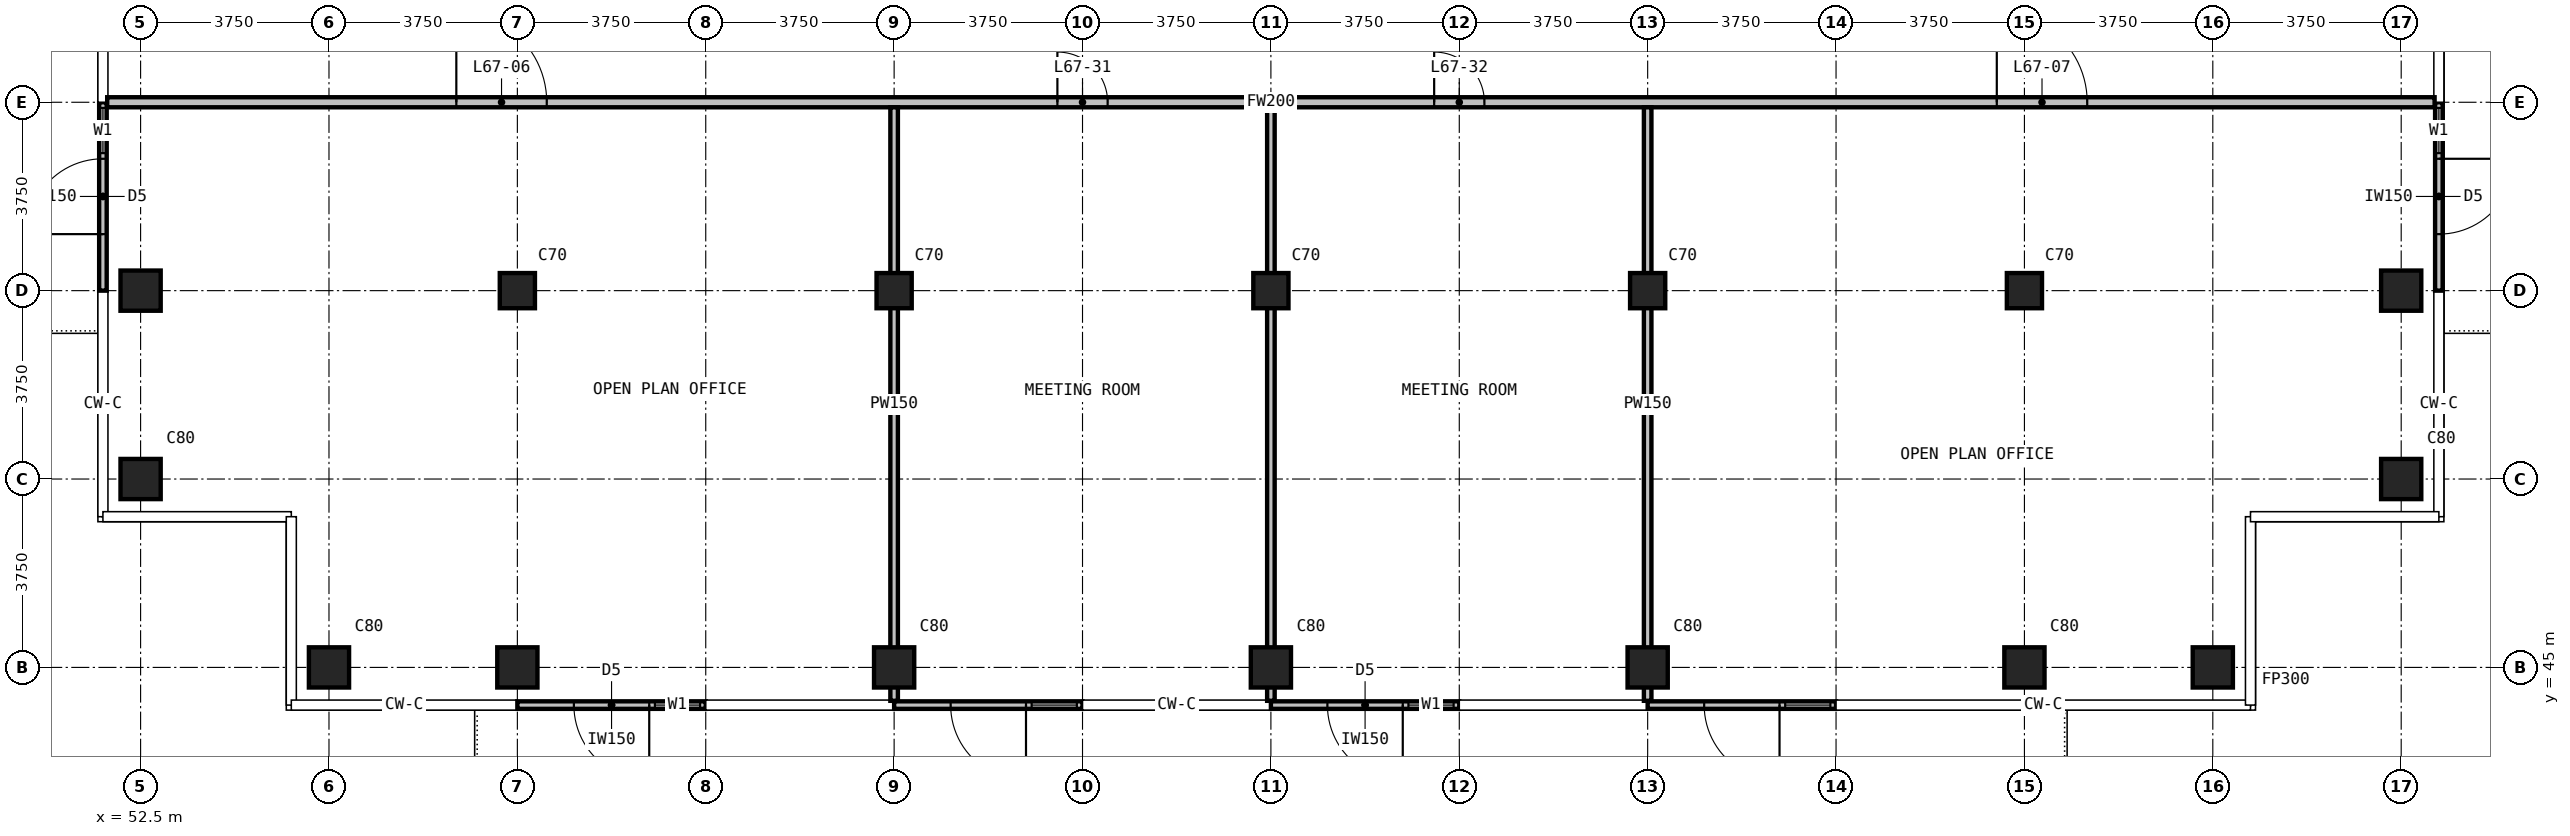
"""IFC4 building model, lengths in metres.
Left out: names, types, materials, properties, quantities, classifications, styles, units other than length and angle.
Written with IfcOpenShell. Run it as: python <this file> out.ifc"""

import sys

from ifc_helpers import new_model, si_unit, direction, frame, frame_2d, origin, origin_2d, place, context, subcontext, project, spatial, rectangle, extrude, element, fill, save


model = new_model("IFC4")
c1 = context("Model", 3, precision=1e-05, world=origin(), true_north=direction((0.0, 1.0)))
c2 = subcontext(c1, "Body", "Model", "MODEL_VIEW")
j1 = project(units=[si_unit("LENGTHUNIT", "METRE"), si_unit("PLANEANGLEUNIT", "RADIAN")], contexts=[c1])
p1 = place(None, origin())
s1 = spatial("IfcSite", under=j1, at=p1, CompositionType="ELEMENT")
p2 = place(p1, origin())
s2 = spatial("IfcBuilding", under=s1, at=p2, CompositionType="ELEMENT")
p3 = place(p2, frame((0.0, 0.0, 258.5)))
s3 = spatial("IfcBuildingStorey", under=s2, at=p3, CompositionType="ELEMENT", Elevation=258.5)
for number, where, z_axis, x_axis in (
    (1, (52.5, 48.75, 0.0), (0.0, 0.0, 1.0), (1.0, 0.0, 0.0)),
    (2, (52.5, 52.5, 0.0), (0.0, 0.0, 1.0), (1.0, 0.0, 0.0)),
    (3, (56.25, 45.0, 0.0), (0.0, 0.0, 1.0), (1.0, 0.0, 0.0)),
    (4, (60.0, 45.0, 0.0), (0.0, 0.0, 1.0), (1.0, 0.0, 0.0)),
):
    element("IfcColumn", number, at=place(p3, frame(where, z_axis=z_axis, x_axis=x_axis)), inside=s3, PredefinedType="COLUMN", context=c2, shape_type="SweptSolid", body=[
        extrude(rectangle(XDim=0.8, YDim=0.8, at=origin_2d()), origin(), (0.0, 0.0, 1.0), 3.6),
    ])
p4 = place(p3, frame((60.0, 52.5, 0.0), z_axis=(0.0, 0.0, 1.0), x_axis=(1.0, 0.0, 0.0)))
e5 = element("IfcColumn", 5, at=p4, inside=s3, PredefinedType="COLUMN", context=c2, shape_type="SweptSolid", body=[
    extrude(rectangle(XDim=0.7, YDim=0.7, at=origin_2d()), origin(), (0.0, 0.0, 1.0), 3.6),
])
p5 = place(p3, frame((67.5, 45.0, 0.0), z_axis=(0.0, 0.0, 1.0), x_axis=(1.0, 0.0, 0.0)))
e6 = element("IfcColumn", 6, at=p5, inside=s3, PredefinedType="COLUMN", context=c2, shape_type="SweptSolid", body=[
    extrude(rectangle(XDim=0.8, YDim=0.8, at=origin_2d()), origin(), (0.0, 0.0, 1.0), 3.6),
])
p6 = place(p3, frame((67.5, 52.5, 0.0), z_axis=(0.0, 0.0, 1.0), x_axis=(1.0, 0.0, 0.0)))
e7 = element("IfcColumn", 7, at=p6, inside=s3, PredefinedType="COLUMN", context=c2, shape_type="SweptSolid", body=[
    extrude(rectangle(XDim=0.7, YDim=0.7, at=origin_2d()), origin(), (0.0, 0.0, 1.0), 3.6),
])
p7 = place(p3, frame((75.0, 45.0, 0.0), z_axis=(0.0, 0.0, 1.0), x_axis=(1.0, 0.0, 0.0)))
e8 = element("IfcColumn", 8, at=p7, inside=s3, PredefinedType="COLUMN", context=c2, shape_type="SweptSolid", body=[
    extrude(rectangle(XDim=0.8, YDim=0.8, at=origin_2d()), origin(), (0.0, 0.0, 1.0), 3.6),
])
p8 = place(p3, frame((75.0, 52.5, 0.0), z_axis=(0.0, 0.0, 1.0), x_axis=(1.0, 0.0, 0.0)))
e9 = element("IfcColumn", 9, at=p8, inside=s3, PredefinedType="COLUMN", context=c2, shape_type="SweptSolid", body=[
    extrude(rectangle(XDim=0.7, YDim=0.7, at=origin_2d()), origin(), (0.0, 0.0, 1.0), 3.6),
])
p9 = place(p3, frame((82.5, 45.0, 0.0), z_axis=(0.0, 0.0, 1.0), x_axis=(1.0, 0.0, 0.0)))
e10 = element("IfcColumn", 10, at=p9, inside=s3, PredefinedType="COLUMN", context=c2, shape_type="SweptSolid", body=[
    extrude(rectangle(XDim=0.8, YDim=0.8, at=origin_2d()), origin(), (0.0, 0.0, 1.0), 3.6),
])
p10 = place(p3, frame((82.5, 52.5, 0.0), z_axis=(0.0, 0.0, 1.0), x_axis=(1.0, 0.0, 0.0)))
e11 = element("IfcColumn", 11, at=p10, inside=s3, PredefinedType="COLUMN", context=c2, shape_type="SweptSolid", body=[
    extrude(rectangle(XDim=0.7, YDim=0.7, at=origin_2d()), origin(), (0.0, 0.0, 1.0), 3.6),
])
p11 = place(p3, frame((90.0, 45.0, 0.0), z_axis=(0.0, 0.0, 1.0), x_axis=(1.0, 0.0, 0.0)))
e12 = element("IfcColumn", 12, at=p11, inside=s3, PredefinedType="COLUMN", context=c2, shape_type="SweptSolid", body=[
    extrude(rectangle(XDim=0.8, YDim=0.8, at=origin_2d()), origin(), (0.0, 0.0, 1.0), 3.6),
])
p12 = place(p3, frame((90.0, 52.5, 0.0), z_axis=(0.0, 0.0, 1.0), x_axis=(1.0, 0.0, 0.0)))
e13 = element("IfcColumn", 13, at=p12, inside=s3, PredefinedType="COLUMN", context=c2, shape_type="SweptSolid", body=[
    extrude(rectangle(XDim=0.7, YDim=0.7, at=origin_2d()), origin(), (0.0, 0.0, 1.0), 3.6),
])
for number, where, z_axis, x_axis in (
    (14, (93.75, 45.0, 0.0), (0.0, 0.0, 1.0), (1.0, 0.0, 0.0)),
    (15, (97.5, 48.75, 0.0), (0.0, 0.0, 1.0), (1.0, 0.0, 0.0)),
    (16, (97.5, 52.5, 0.0), (0.0, 0.0, 1.0), (1.0, 0.0, 0.0)),
):
    element("IfcColumn", number, at=place(p3, frame(where, z_axis=z_axis, x_axis=x_axis)), inside=s3, PredefinedType="COLUMN", context=c2, shape_type="SweptSolid", body=[
        extrude(rectangle(XDim=0.8, YDim=0.8, at=origin_2d()), origin(), (0.0, 0.0, 1.0), 3.6),
    ])
p13 = place(p3, frame((98.25, 56.25, 0.0), z_axis=(0.0, 0.0, 1.0), x_axis=(0.0, -1.0, 0.0)))
e17 = element("IfcWall", 17, at=p13, inside=s3, PredefinedType="SOLIDWALL", context=c2, shape_type="SweptSolid", body=[
    extrude(rectangle(XDim=3.75, YDim=0.15, at=frame_2d((1.875, 0.0))), origin(), (0.0, 0.0, 1.0), 3.3),
])
p14 = place(p13, frame((0.113, 0.0, 0.1)))
e18 = element("IfcOpeningElement", 18, at=p14, cuts=e17, PredefinedType="OPENING", context=c2, shape_type="SweptSolid", body=[
    extrude(rectangle(XDim=0.9, YDim=2.4, at=frame_2d((0.45, 1.2))), frame((0.0, 0.085, 0.0), z_axis=(0.0, -1.0, 0.0), x_axis=(1.0, 0.0, 0.0)), (0.0, 0.0, 1.0), 0.17),
])
p15 = place(p13, frame((1.125, 0.0, 0.0)))
e19 = element("IfcOpeningElement", 19, at=p15, cuts=e17, PredefinedType="OPENING", context=c2, shape_type="SweptSolid", body=[
    extrude(rectangle(XDim=1.5, YDim=2.4, at=frame_2d((0.75, 1.2))), frame((0.0, 0.085, 0.0), z_axis=(0.0, -1.0, 0.0), x_axis=(1.0, 0.0, 0.0)), (0.0, 0.0, 1.0), 0.17),
])
p16 = place(p3, frame((51.75, 52.5, 0.0), z_axis=(0.0, 0.0, 1.0), x_axis=(0.0, 1.0, 0.0)))
e20 = element("IfcWall", 20, at=p16, inside=s3, PredefinedType="SOLIDWALL", context=c2, shape_type="SweptSolid", body=[
    extrude(rectangle(XDim=3.75, YDim=0.15, at=frame_2d((1.875, 0.0))), origin(), (0.0, 0.0, 1.0), 3.3),
])
p17 = place(p16, frame((1.125, 0.0, 0.0)))
e21 = element("IfcOpeningElement", 21, at=p17, cuts=e20, PredefinedType="OPENING", context=c2, shape_type="SweptSolid", body=[
    extrude(rectangle(XDim=1.5, YDim=2.4, at=frame_2d((0.75, 1.2))), frame((0.0, 0.085, 0.0), z_axis=(0.0, -1.0, 0.0), x_axis=(1.0, 0.0, 0.0)), (0.0, 0.0, 1.0), 0.17),
])
p18 = place(p16, frame((2.738, 0.0, 0.1)))
e22 = element("IfcOpeningElement", 22, at=p18, cuts=e20, PredefinedType="OPENING", context=c2, shape_type="SweptSolid", body=[
    extrude(rectangle(XDim=0.9, YDim=2.4, at=frame_2d((0.45, 1.2))), frame((0.0, 0.085, 0.0), z_axis=(0.0, -1.0, 0.0), x_axis=(1.0, 0.0, 0.0)), (0.0, 0.0, 1.0), 0.17),
])
p19 = place(p3, frame((63.75, 44.25, 0.0), z_axis=(0.0, 0.0, 1.0), x_axis=(-1.0, 0.0, 0.0)))
e23 = element("IfcWall", 23, at=p19, inside=s3, PredefinedType="SOLIDWALL", context=c2, shape_type="SweptSolid", body=[
    extrude(rectangle(XDim=3.75, YDim=0.15, at=frame_2d((1.875, 0.0))), origin(), (0.0, 0.0, 1.0), 3.3),
])
p20 = place(p19, frame((0.113, 0.0, 0.1)))
e24 = element("IfcOpeningElement", 24, at=p20, cuts=e23, PredefinedType="OPENING", context=c2, shape_type="SweptSolid", body=[
    extrude(rectangle(XDim=0.9, YDim=2.4, at=frame_2d((0.45, 1.2))), frame((0.0, 0.085, 0.0), z_axis=(0.0, -1.0, 0.0), x_axis=(1.0, 0.0, 0.0)), (0.0, 0.0, 1.0), 0.17),
])
p21 = place(p19, frame((1.125, 0.0, 0.0)))
e25 = element("IfcOpeningElement", 25, at=p21, cuts=e23, PredefinedType="OPENING", context=c2, shape_type="SweptSolid", body=[
    extrude(rectangle(XDim=1.5, YDim=2.4, at=frame_2d((0.75, 1.2))), frame((0.0, 0.085, 0.0), z_axis=(0.0, -1.0, 0.0), x_axis=(1.0, 0.0, 0.0)), (0.0, 0.0, 1.0), 0.17),
])
p22 = place(p3, frame((71.25, 44.25, 0.0), z_axis=(0.0, 0.0, 1.0), x_axis=(-1.0, 0.0, 0.0)))
e26 = element("IfcWall", 26, at=p22, inside=s3, PredefinedType="SOLIDWALL", context=c2, shape_type="SweptSolid", body=[
    extrude(rectangle(XDim=3.75, YDim=0.15, at=frame_2d((1.875, 0.0))), origin(), (0.0, 0.0, 1.0), 3.3),
])
p23 = place(p22, frame((0.113, 0.0, 0.1)))
e27 = element("IfcOpeningElement", 27, at=p23, cuts=e26, PredefinedType="OPENING", context=c2, shape_type="SweptSolid", body=[
    extrude(rectangle(XDim=0.9, YDim=2.4, at=frame_2d((0.45, 1.2))), frame((0.0, 0.085, 0.0), z_axis=(0.0, -1.0, 0.0), x_axis=(1.0, 0.0, 0.0)), (0.0, 0.0, 1.0), 0.17),
])
p24 = place(p22, frame((1.125, 0.0, 0.0)))
e28 = element("IfcOpeningElement", 28, at=p24, cuts=e26, PredefinedType="OPENING", context=c2, shape_type="SweptSolid", body=[
    extrude(rectangle(XDim=1.5, YDim=2.4, at=frame_2d((0.75, 1.2))), frame((0.0, 0.085, 0.0), z_axis=(0.0, -1.0, 0.0), x_axis=(1.0, 0.0, 0.0)), (0.0, 0.0, 1.0), 0.17),
])
p25 = place(p3, frame((78.75, 44.25, 0.0), z_axis=(0.0, 0.0, 1.0), x_axis=(-1.0, 0.0, 0.0)))
e29 = element("IfcWall", 29, at=p25, inside=s3, PredefinedType="SOLIDWALL", context=c2, shape_type="SweptSolid", body=[
    extrude(rectangle(XDim=3.75, YDim=0.15, at=frame_2d((1.875, 0.0))), origin(), (0.0, 0.0, 1.0), 3.3),
])
p26 = place(p25, frame((0.113, 0.0, 0.1)))
e30 = element("IfcOpeningElement", 30, at=p26, cuts=e29, PredefinedType="OPENING", context=c2, shape_type="SweptSolid", body=[
    extrude(rectangle(XDim=0.9, YDim=2.4, at=frame_2d((0.45, 1.2))), frame((0.0, 0.085, 0.0), z_axis=(0.0, -1.0, 0.0), x_axis=(1.0, 0.0, 0.0)), (0.0, 0.0, 1.0), 0.17),
])
p27 = place(p25, frame((1.125, 0.0, 0.0)))
e31 = element("IfcOpeningElement", 31, at=p27, cuts=e29, PredefinedType="OPENING", context=c2, shape_type="SweptSolid", body=[
    extrude(rectangle(XDim=1.5, YDim=2.4, at=frame_2d((0.75, 1.2))), frame((0.0, 0.085, 0.0), z_axis=(0.0, -1.0, 0.0), x_axis=(1.0, 0.0, 0.0)), (0.0, 0.0, 1.0), 0.17),
])
p28 = place(p3, frame((86.25, 44.25, 0.0), z_axis=(0.0, 0.0, 1.0), x_axis=(-1.0, 0.0, 0.0)))
e32 = element("IfcWall", 32, at=p28, inside=s3, PredefinedType="SOLIDWALL", context=c2, shape_type="SweptSolid", body=[
    extrude(rectangle(XDim=3.75, YDim=0.15, at=frame_2d((1.875, 0.0))), origin(), (0.0, 0.0, 1.0), 3.3),
])
p29 = place(p28, frame((0.113, 0.0, 0.1)))
e33 = element("IfcOpeningElement", 33, at=p29, cuts=e32, PredefinedType="OPENING", context=c2, shape_type="SweptSolid", body=[
    extrude(rectangle(XDim=0.9, YDim=2.4, at=frame_2d((0.45, 1.2))), frame((0.0, 0.085, 0.0), z_axis=(0.0, -1.0, 0.0), x_axis=(1.0, 0.0, 0.0)), (0.0, 0.0, 1.0), 0.17),
])
p30 = place(p28, frame((1.125, 0.0, 0.0)))
e34 = element("IfcOpeningElement", 34, at=p30, cuts=e32, PredefinedType="OPENING", context=c2, shape_type="SweptSolid", body=[
    extrude(rectangle(XDim=1.5, YDim=2.4, at=frame_2d((0.75, 1.2))), frame((0.0, 0.085, 0.0), z_axis=(0.0, -1.0, 0.0), x_axis=(1.0, 0.0, 0.0)), (0.0, 0.0, 1.0), 0.17),
])
p31 = place(p3, frame((51.835, 56.25, 0.0), z_axis=(0.0, 0.0, 1.0), x_axis=(1.0, 0.0, 0.0)))
e35 = element("IfcWall", 35, at=p31, inside=s3, PredefinedType="PARTITIONING", context=c2, shape_type="SweptSolid", body=[
    extrude(rectangle(XDim=46.33, YDim=0.2, at=frame_2d((23.165, 0.0))), origin(), (0.0, 0.0, 1.0), 3.3),
])
p32 = place(p31, frame((6.95, 0.0, 0.0)))
e36 = element("IfcOpeningElement", 36, at=p32, cuts=e35, PredefinedType="OPENING", context=c2, shape_type="SweptSolid", body=[
    extrude(rectangle(XDim=1.8, YDim=2.2, at=frame_2d((0.9, 1.1))), frame((0.0, 0.11, 0.0), z_axis=(0.0, -1.0, 0.0), x_axis=(1.0, 0.0, 0.0)), (0.0, 0.0, 1.0), 0.22),
])
p33 = place(p31, frame((37.615, 0.0, 0.0)))
e37 = element("IfcOpeningElement", 37, at=p33, cuts=e35, PredefinedType="OPENING", context=c2, shape_type="SweptSolid", body=[
    extrude(rectangle(XDim=1.8, YDim=2.2, at=frame_2d((0.9, 1.1))), frame((0.0, 0.11, 0.0), z_axis=(0.0, -1.0, 0.0), x_axis=(1.0, 0.0, 0.0)), (0.0, 0.0, 1.0), 0.22),
])
p34 = place(p31, frame((18.915, 0.0, 0.0)))
e38 = element("IfcOpeningElement", 38, at=p34, cuts=e35, PredefinedType="OPENING", context=c2, shape_type="SweptSolid", body=[
    extrude(rectangle(XDim=1.0, YDim=2.2, at=frame_2d((0.5, 1.1))), frame((0.0, 0.11, 0.0), z_axis=(0.0, -1.0, 0.0), x_axis=(1.0, 0.0, 0.0)), (0.0, 0.0, 1.0), 0.22),
])
p35 = place(p31, frame((26.415, 0.0, 0.0)))
e39 = element("IfcOpeningElement", 39, at=p35, cuts=e35, PredefinedType="OPENING", context=c2, shape_type="SweptSolid", body=[
    extrude(rectangle(XDim=1.0, YDim=2.2, at=frame_2d((0.5, 1.1))), frame((0.0, 0.11, 0.0), z_axis=(0.0, -1.0, 0.0), x_axis=(1.0, 0.0, 0.0)), (0.0, 0.0, 1.0), 0.22),
])
for number, where, z_axis, x_axis in (
    (40, (67.5, 44.335, 0.0), (0.0, 0.0, 1.0), (0.0, 1.0, 0.0)),
    (41, (75.0, 44.335, 0.0), (0.0, 0.0, 1.0), (0.0, 1.0, 0.0)),
    (42, (82.5, 44.335, 0.0), (0.0, 0.0, 1.0), (0.0, 1.0, 0.0)),
):
    element("IfcWall", number, at=place(p3, frame(where, z_axis=z_axis, x_axis=x_axis)), inside=s3, PredefinedType="PARTITIONING", context=c2, shape_type="SweptSolid", body=[
        extrude(rectangle(XDim=11.815, YDim=0.15, at=frame_2d((5.907, 0.0))), origin(), (0.0, 0.0, 1.0), 3.3),
    ])
p36 = place(p14, origin())
e43 = element("IfcWindow", 43, at=p36, inside=s3, PartitioningType="SINGLE_PANEL", PredefinedType="WINDOW", context=c2, shape_type="SweptSolid", body=[
    extrude(rectangle(XDim=0.9, YDim=2.4, at=frame_2d((0.45, 1.2))), frame((0.0, 0.03, 0.0), z_axis=(0.0, -1.0, 0.0), x_axis=(1.0, 0.0, 0.0)), (0.0, 0.0, 1.0), 0.06),
])
fill(e18, e43)
p37 = place(p15, origin())
e44 = element("IfcDoor", 44, at=p37, inside=s3, OperationType="DOUBLE_DOOR_SINGLE_SWING", PredefinedType="DOOR", context=c2, shape_type="SweptSolid", body=[
    extrude(rectangle(XDim=1.5, YDim=2.4, at=frame_2d((0.75, 1.2))), frame((0.0, 0.025, 0.0), z_axis=(0.0, -1.0, 0.0), x_axis=(1.0, 0.0, 0.0)), (0.0, 0.0, 1.0), 0.05),
])
fill(e19, e44)
p38 = place(p17, origin())
e45 = element("IfcDoor", 45, at=p38, inside=s3, OperationType="DOUBLE_DOOR_SINGLE_SWING", PredefinedType="DOOR", context=c2, shape_type="SweptSolid", body=[
    extrude(rectangle(XDim=1.5, YDim=2.4, at=frame_2d((0.75, 1.2))), frame((0.0, 0.025, 0.0), z_axis=(0.0, -1.0, 0.0), x_axis=(1.0, 0.0, 0.0)), (0.0, 0.0, 1.0), 0.05),
])
fill(e21, e45)
p39 = place(p18, origin())
e46 = element("IfcWindow", 46, at=p39, inside=s3, PartitioningType="SINGLE_PANEL", PredefinedType="WINDOW", context=c2, shape_type="SweptSolid", body=[
    extrude(rectangle(XDim=0.9, YDim=2.4, at=frame_2d((0.45, 1.2))), frame((0.0, 0.03, 0.0), z_axis=(0.0, -1.0, 0.0), x_axis=(1.0, 0.0, 0.0)), (0.0, 0.0, 1.0), 0.06),
])
fill(e22, e46)
p40 = place(p20, origin())
e47 = element("IfcWindow", 47, at=p40, inside=s3, PartitioningType="SINGLE_PANEL", PredefinedType="WINDOW", context=c2, shape_type="SweptSolid", body=[
    extrude(rectangle(XDim=0.9, YDim=2.4, at=frame_2d((0.45, 1.2))), frame((0.0, 0.03, 0.0), z_axis=(0.0, -1.0, 0.0), x_axis=(1.0, 0.0, 0.0)), (0.0, 0.0, 1.0), 0.06),
])
fill(e24, e47)
p41 = place(p21, origin())
e48 = element("IfcDoor", 48, at=p41, inside=s3, OperationType="DOUBLE_DOOR_SINGLE_SWING", PredefinedType="DOOR", context=c2, shape_type="SweptSolid", body=[
    extrude(rectangle(XDim=1.5, YDim=2.4, at=frame_2d((0.75, 1.2))), frame((0.0, 0.025, 0.0), z_axis=(0.0, -1.0, 0.0), x_axis=(1.0, 0.0, 0.0)), (0.0, 0.0, 1.0), 0.05),
])
fill(e25, e48)
p42 = place(p23, origin())
e49 = element("IfcWindow", 49, at=p42, inside=s3, PartitioningType="SINGLE_PANEL", PredefinedType="WINDOW", context=c2, shape_type="SweptSolid", body=[
    extrude(rectangle(XDim=0.9, YDim=2.4, at=frame_2d((0.45, 1.2))), frame((0.0, 0.03, 0.0), z_axis=(0.0, -1.0, 0.0), x_axis=(1.0, 0.0, 0.0)), (0.0, 0.0, 1.0), 0.06),
])
fill(e27, e49)
p43 = place(p24, origin())
e50 = element("IfcDoor", 50, at=p43, inside=s3, OperationType="DOUBLE_DOOR_SINGLE_SWING", PredefinedType="DOOR", context=c2, shape_type="SweptSolid", body=[
    extrude(rectangle(XDim=1.5, YDim=2.4, at=frame_2d((0.75, 1.2))), frame((0.0, 0.025, 0.0), z_axis=(0.0, -1.0, 0.0), x_axis=(1.0, 0.0, 0.0)), (0.0, 0.0, 1.0), 0.05),
])
fill(e28, e50)
p44 = place(p26, origin())
e51 = element("IfcWindow", 51, at=p44, inside=s3, PartitioningType="SINGLE_PANEL", PredefinedType="WINDOW", context=c2, shape_type="SweptSolid", body=[
    extrude(rectangle(XDim=0.9, YDim=2.4, at=frame_2d((0.45, 1.2))), frame((0.0, 0.03, 0.0), z_axis=(0.0, -1.0, 0.0), x_axis=(1.0, 0.0, 0.0)), (0.0, 0.0, 1.0), 0.06),
])
fill(e30, e51)
p45 = place(p27, origin())
e52 = element("IfcDoor", 52, at=p45, inside=s3, OperationType="DOUBLE_DOOR_SINGLE_SWING", PredefinedType="DOOR", context=c2, shape_type="SweptSolid", body=[
    extrude(rectangle(XDim=1.5, YDim=2.4, at=frame_2d((0.75, 1.2))), frame((0.0, 0.025, 0.0), z_axis=(0.0, -1.0, 0.0), x_axis=(1.0, 0.0, 0.0)), (0.0, 0.0, 1.0), 0.05),
])
fill(e31, e52)
p46 = place(p29, origin())
e53 = element("IfcWindow", 53, at=p46, inside=s3, PartitioningType="SINGLE_PANEL", PredefinedType="WINDOW", context=c2, shape_type="SweptSolid", body=[
    extrude(rectangle(XDim=0.9, YDim=2.4, at=frame_2d((0.45, 1.2))), frame((0.0, 0.03, 0.0), z_axis=(0.0, -1.0, 0.0), x_axis=(1.0, 0.0, 0.0)), (0.0, 0.0, 1.0), 0.06),
])
fill(e33, e53)
p47 = place(p30, origin())
e54 = element("IfcDoor", 54, at=p47, inside=s3, OperationType="DOUBLE_DOOR_SINGLE_SWING", PredefinedType="DOOR", context=c2, shape_type="SweptSolid", body=[
    extrude(rectangle(XDim=1.5, YDim=2.4, at=frame_2d((0.75, 1.2))), frame((0.0, 0.025, 0.0), z_axis=(0.0, -1.0, 0.0), x_axis=(1.0, 0.0, 0.0)), (0.0, 0.0, 1.0), 0.05),
])
fill(e34, e54)
p48 = place(p32, origin())
e55 = element("IfcDoor", 55, at=p48, inside=s3, OperationType="DOUBLE_DOOR_SINGLE_SWING", PredefinedType="DOOR", context=c2, shape_type="SweptSolid", body=[
    extrude(rectangle(XDim=1.8, YDim=2.2, at=frame_2d((0.9, 1.1))), frame((0.0, 0.025, 0.0), z_axis=(0.0, -1.0, 0.0), x_axis=(1.0, 0.0, 0.0)), (0.0, 0.0, 1.0), 0.05),
])
fill(e36, e55)
p49 = place(p33, origin())
e56 = element("IfcDoor", 56, at=p49, inside=s3, OperationType="DOUBLE_DOOR_SINGLE_SWING", PredefinedType="DOOR", context=c2, shape_type="SweptSolid", body=[
    extrude(rectangle(XDim=1.8, YDim=2.2, at=frame_2d((0.9, 1.1))), frame((0.0, 0.025, 0.0), z_axis=(0.0, -1.0, 0.0), x_axis=(1.0, 0.0, 0.0)), (0.0, 0.0, 1.0), 0.05),
])
fill(e37, e56)
p50 = place(p34, origin())
e57 = element("IfcDoor", 57, at=p50, inside=s3, OperationType="SINGLE_SWING_LEFT", PredefinedType="DOOR", context=c2, shape_type="SweptSolid", body=[
    extrude(rectangle(XDim=1.0, YDim=2.2, at=frame_2d((0.5, 1.1))), frame((0.0, 0.025, 0.0), z_axis=(0.0, -1.0, 0.0), x_axis=(1.0, 0.0, 0.0)), (0.0, 0.0, 1.0), 0.05),
])
fill(e38, e57)
p51 = place(p35, origin())
e58 = element("IfcDoor", 58, at=p51, inside=s3, OperationType="SINGLE_SWING_LEFT", PredefinedType="DOOR", context=c2, shape_type="SweptSolid", body=[
    extrude(rectangle(XDim=1.0, YDim=2.2, at=frame_2d((0.5, 1.1))), frame((0.0, 0.025, 0.0), z_axis=(0.0, -1.0, 0.0), x_axis=(1.0, 0.0, 0.0)), (0.0, 0.0, 1.0), 0.05),
])
fill(e39, e58)
save(model, sys.argv[1])
